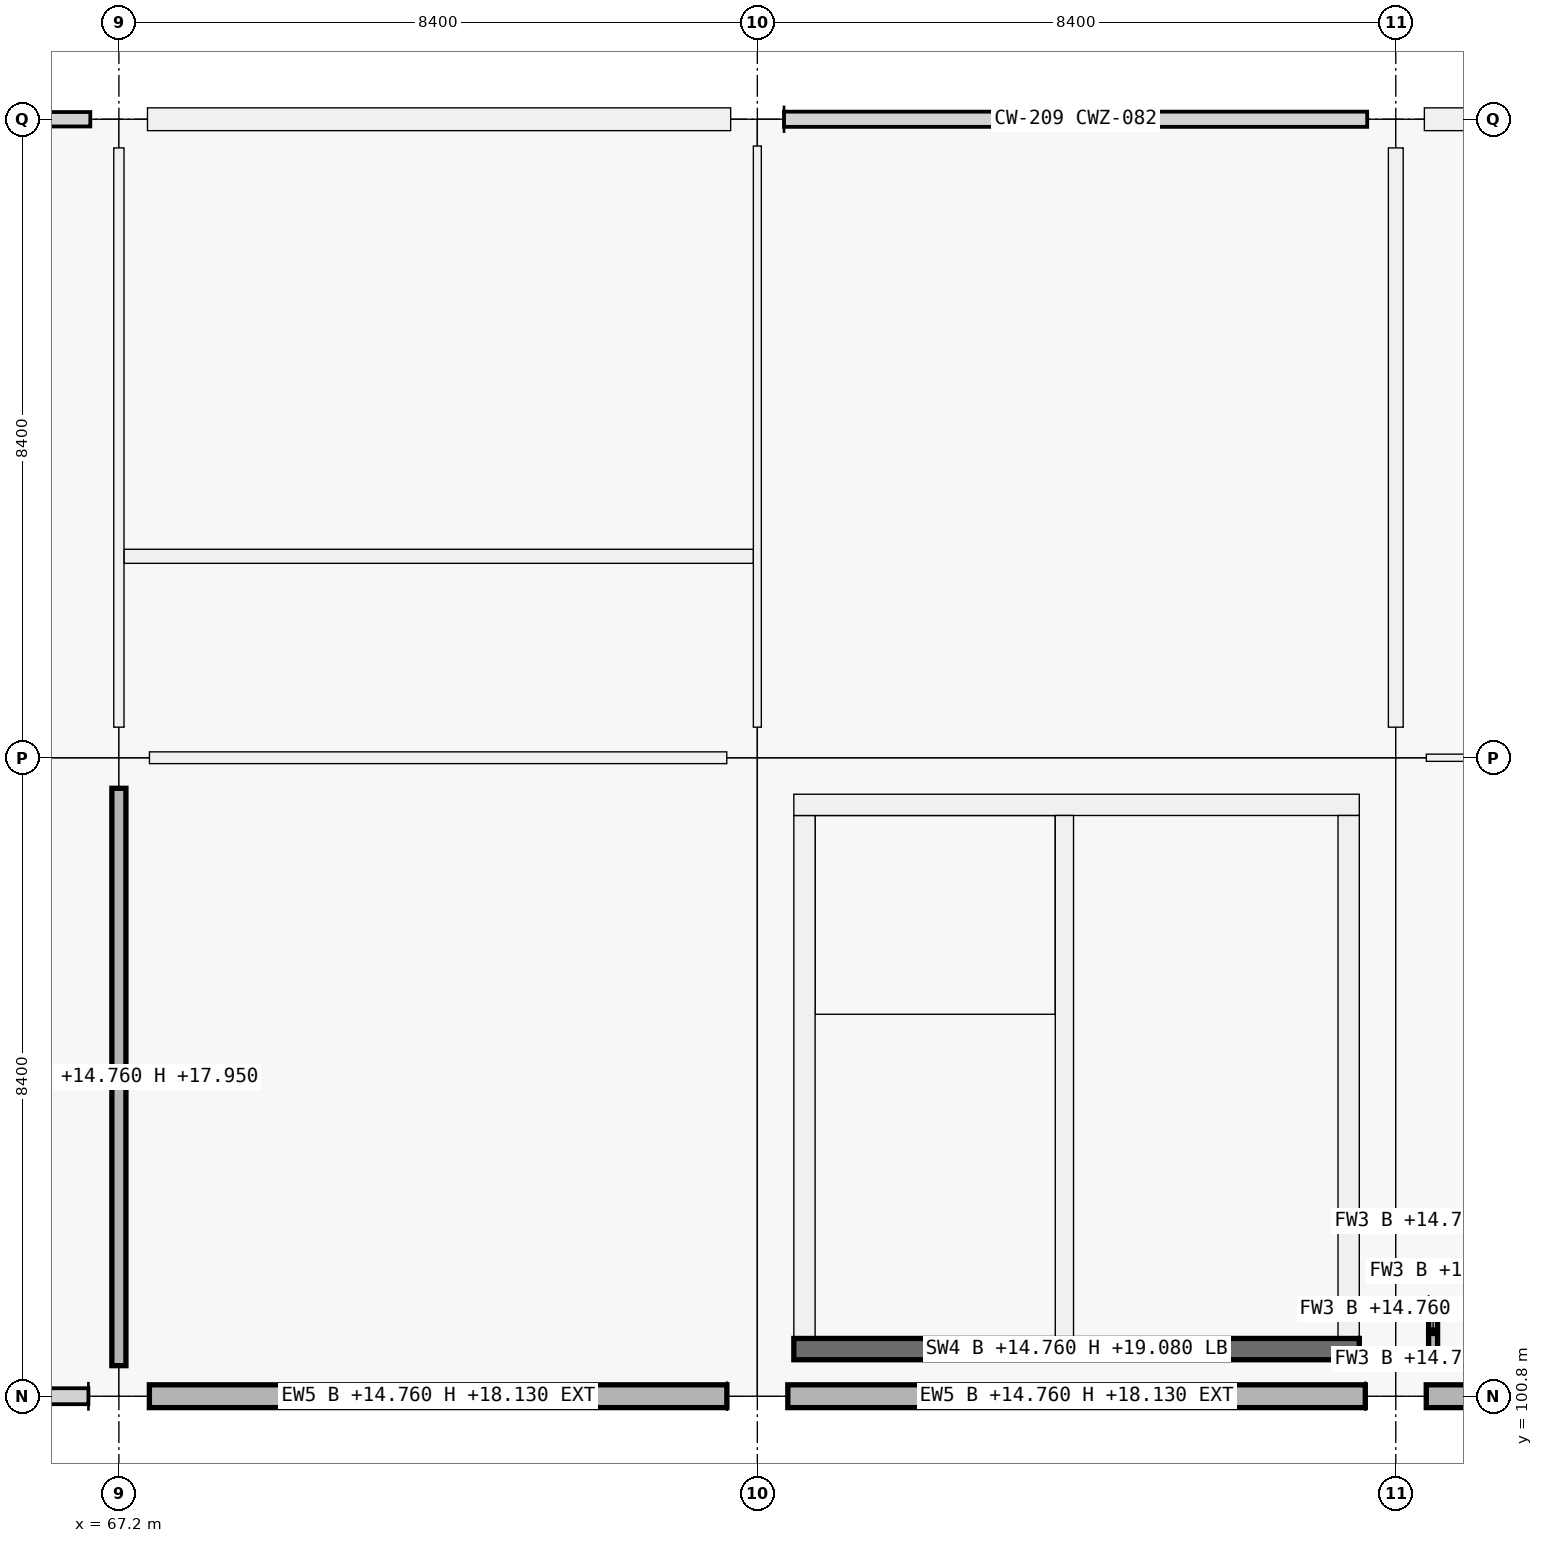
"""IFC4 building model, lengths in metres.
Left out: names, types, materials, properties, quantities, classifications, styles, units other than length and angle.
Written with IfcOpenShell. Run it as: python <this file> out.ifc"""

import sys

from ifc_helpers import new_model, si_unit, direction, frame, frame_2d, origin, origin_2d, place, context, subcontext, project, spatial, rectangle, extrude, element, fill, save


model = new_model("IFC4")
c1 = context("Model", 3, precision=1e-05, world=origin(), true_north=direction((0.0, 1.0)))
c2 = subcontext(c1, "Body", "Model", "MODEL_VIEW")
j1 = project(units=[si_unit("LENGTHUNIT", "METRE"), si_unit("PLANEANGLEUNIT", "RADIAN")], contexts=[c1])
p1 = place(None, origin())
s1 = spatial("IfcSite", under=j1, at=p1, CompositionType="ELEMENT")
p2 = place(p1, origin())
s2 = spatial("IfcBuilding", under=s1, at=p2, CompositionType="ELEMENT")
p3 = place(p2, frame((0.0, 0.0, 14.76)))
s3 = spatial("IfcBuildingStorey", under=s2, at=p3, CompositionType="ELEMENT", Elevation=14.76)
for number, where, z_axis, x_axis in (
    (1, (67.2, 100.8, 0.0), (0.0, 0.0, 1.0), (1.0, 0.0, 0.0)),
    (2, (67.2, 109.2, 0.0), (0.0, 0.0, 1.0), (1.0, 0.0, 0.0)),
):
    element("IfcColumn", number, at=place(p3, frame(where, z_axis=z_axis, x_axis=x_axis)), inside=s3, PredefinedType="COLUMN", context=c2, shape_type="SweptSolid", body=[
        extrude(rectangle(XDim=0.8, YDim=0.8, at=origin_2d()), origin(), (0.0, 0.0, 1.0), 4.32),
    ])
p4 = place(p3, frame((67.2, 117.6, 0.0), z_axis=(0.0, 0.0, 1.0), x_axis=(1.0, 0.0, 0.0)))
e3 = element("IfcColumn", 3, at=p4, inside=s3, PredefinedType="COLUMN", context=c2, shape_type="SweptSolid", body=[
    extrude(rectangle(XDim=0.75, YDim=0.75, at=origin_2d()), origin(), (0.0, 0.0, 1.0), 4.32),
])
for number, where, z_axis, x_axis in (
    (4, (75.6, 100.8, 0.0), (0.0, 0.0, 1.0), (1.0, 0.0, 0.0)),
    (5, (75.6, 109.2, 0.0), (0.0, 0.0, 1.0), (1.0, 0.0, 0.0)),
):
    element("IfcColumn", number, at=place(p3, frame(where, z_axis=z_axis, x_axis=x_axis)), inside=s3, PredefinedType="COLUMN", context=c2, shape_type="SweptSolid", body=[
        extrude(rectangle(XDim=0.8, YDim=0.8, at=origin_2d()), origin(), (0.0, 0.0, 1.0), 4.32),
    ])
p5 = place(p3, frame((75.6, 117.6, 0.0), z_axis=(0.0, 0.0, 1.0), x_axis=(1.0, 0.0, 0.0)))
e6 = element("IfcColumn", 6, at=p5, inside=s3, PredefinedType="COLUMN", context=c2, shape_type="SweptSolid", body=[
    extrude(rectangle(XDim=0.7, YDim=0.7, at=origin_2d()), origin(), (0.0, 0.0, 1.0), 4.32),
])
for number, where, z_axis, x_axis in (
    (7, (84.0, 100.8, 0.0), (0.0, 0.0, 1.0), (1.0, 0.0, 0.0)),
    (8, (84.0, 109.2, 0.0), (0.0, 0.0, 1.0), (1.0, 0.0, 0.0)),
):
    element("IfcColumn", number, at=place(p3, frame(where, z_axis=z_axis, x_axis=x_axis)), inside=s3, PredefinedType="COLUMN", context=c2, shape_type="SweptSolid", body=[
        extrude(rectangle(XDim=0.8, YDim=0.8, at=origin_2d()), origin(), (0.0, 0.0, 1.0), 4.32),
    ])
p6 = place(p3, frame((84.0, 117.6, 0.0), z_axis=(0.0, 0.0, 1.0), x_axis=(1.0, 0.0, 0.0)))
e9 = element("IfcColumn", 9, at=p6, inside=s3, PredefinedType="COLUMN", context=c2, shape_type="SweptSolid", body=[
    extrude(rectangle(XDim=0.75, YDim=0.75, at=origin_2d()), origin(), (0.0, 0.0, 1.0), 4.32),
])
p7 = place(p3, frame((75.199, 100.8, 0.0), z_axis=(0.0, 0.0, 1.0), x_axis=(-1.0, 0.0, 0.0)))
e10 = element("IfcWall", 10, at=p7, inside=s3, PredefinedType="SOLIDWALL", context=c2, shape_type="SweptSolid", body=[
    extrude(rectangle(XDim=7.598, YDim=0.3, at=frame_2d((3.799, 0.0))), origin(), (0.0, 0.0, 1.0), 3.37),
])
p8 = place(p7, frame((2.924, 0.0, 0.9)))
e11 = element("IfcOpeningElement", 11, at=p8, cuts=e10, PredefinedType="OPENING", context=c2, shape_type="SweptSolid", body=[
    extrude(rectangle(XDim=1.75, YDim=1.95, at=frame_2d((0.875, 0.975))), frame((0.0, 0.15, 0.0), z_axis=(0.0, -1.0, 0.0), x_axis=(1.0, 0.0, 0.0)), (0.0, 0.0, 1.0), 0.3),
])
p9 = place(p3, frame((67.576, 117.6, 0.0), z_axis=(0.0, 0.0, 1.0), x_axis=(1.0, 0.0, 0.0)))
e12 = element("IfcWall", 12, at=p9, inside=s3, PredefinedType="SOLIDWALL", context=c2, shape_type="SweptSolid", body=[
    extrude(rectangle(XDim=7.673, YDim=0.3, at=frame_2d((3.836, 0.0))), origin(), (0.0, 0.0, 1.0), 3.37),
])
p10 = place(p9, frame((2.761, 0.0, 0.9)))
e13 = element("IfcOpeningElement", 13, at=p10, cuts=e12, PredefinedType="OPENING", context=c2, shape_type="SweptSolid", body=[
    extrude(rectangle(XDim=2.15, YDim=1.95, at=frame_2d((1.075, 0.975))), frame((0.0, 0.15, 0.0), z_axis=(0.0, -1.0, 0.0), x_axis=(1.0, 0.0, 0.0)), (0.0, 0.0, 1.0), 0.3),
])
p11 = place(p3, frame((83.599, 100.8, 0.0), z_axis=(0.0, 0.0, 1.0), x_axis=(-1.0, 0.0, 0.0)))
e14 = element("IfcWall", 14, at=p11, inside=s3, PredefinedType="SOLIDWALL", context=c2, shape_type="SweptSolid", body=[
    extrude(rectangle(XDim=7.598, YDim=0.3, at=frame_2d((3.799, 0.0))), origin(), (0.0, 0.0, 1.0), 3.37),
])
p12 = place(p3, frame((91.999, 100.8, 0.0), z_axis=(0.0, 0.0, 1.0), x_axis=(-1.0, 0.0, 0.0)))
e15 = element("IfcWall", 15, at=p12, inside=s3, PredefinedType="SOLIDWALL", context=c2, shape_type="SweptSolid", body=[
    extrude(rectangle(XDim=7.598, YDim=0.3, at=frame_2d((3.799, 0.0))), origin(), (0.0, 0.0, 1.0), 3.37),
])
p13 = place(p12, frame((2.824, 0.0, 0.9)))
e16 = element("IfcOpeningElement", 16, at=p13, cuts=e15, PredefinedType="OPENING", context=c2, shape_type="SweptSolid", body=[
    extrude(rectangle(XDim=1.95, YDim=1.6, at=frame_2d((0.975, 0.8))), frame((0.0, 0.15, 0.0), z_axis=(0.0, -1.0, 0.0), x_axis=(1.0, 0.0, 0.0)), (0.0, 0.0, 1.0), 0.3),
])
p14 = place(p3, frame((84.376, 117.6, 0.0), z_axis=(0.0, 0.0, 1.0), x_axis=(1.0, 0.0, 0.0)))
e17 = element("IfcWall", 17, at=p14, inside=s3, PredefinedType="SOLIDWALL", context=c2, shape_type="SweptSolid", body=[
    extrude(rectangle(XDim=7.673, YDim=0.3, at=frame_2d((3.836, 0.0))), origin(), (0.0, 0.0, 1.0), 3.37),
])
p15 = place(p14, frame((2.662, 0.0, 0.9)))
e18 = element("IfcOpeningElement", 18, at=p15, cuts=e17, PredefinedType="OPENING", context=c2, shape_type="SweptSolid", body=[
    extrude(rectangle(XDim=2.35, YDim=1.6, at=frame_2d((1.175, 0.8))), frame((0.0, 0.15, 0.0), z_axis=(0.0, -1.0, 0.0), x_axis=(1.0, 0.0, 0.0)), (0.0, 0.0, 1.0), 0.3),
])
p16 = place(p3, frame((83.52, 101.42, 0.0), z_axis=(0.0, 0.0, 1.0), x_axis=(-1.0, 0.0, 0.0)))
e19 = element("IfcWall", 19, at=p16, inside=s3, PredefinedType="SHEAR", context=c2, shape_type="SweptSolid", body=[
    extrude(rectangle(XDim=7.44, YDim=0.28, at=frame_2d((3.72, 0.0))), origin(), (0.0, 0.0, 1.0), 4.32),
])
p17 = place(p3, frame((76.22, 101.56, 0.0), z_axis=(0.0, 0.0, 1.0), x_axis=(0.0, 1.0, 0.0)))
e20 = element("IfcWall", 20, at=p17, inside=s3, PredefinedType="SHEAR", context=c2, shape_type="SweptSolid", body=[
    extrude(rectangle(XDim=6.88, YDim=0.28, at=frame_2d((3.44, 0.0))), origin(), (0.0, 0.0, 1.0), 4.32),
])
p18 = place(p3, frame((76.08, 108.58, 0.0), z_axis=(0.0, 0.0, 1.0), x_axis=(1.0, 0.0, 0.0)))
e21 = element("IfcWall", 21, at=p18, inside=s3, PredefinedType="SHEAR", context=c2, shape_type="SweptSolid", body=[
    extrude(rectangle(XDim=7.44, YDim=0.28, at=frame_2d((3.72, 0.0))), origin(), (0.0, 0.0, 1.0), 4.32),
])
p19 = place(p3, frame((83.38, 108.44, 0.0), z_axis=(0.0, 0.0, 1.0), x_axis=(0.0, -1.0, 0.0)))
e22 = element("IfcWall", 22, at=p19, inside=s3, PredefinedType="SHEAR", context=c2, shape_type="SweptSolid", body=[
    extrude(rectangle(XDim=6.88, YDim=0.28, at=frame_2d((3.44, 0.0))), origin(), (0.0, 0.0, 1.0), 4.32),
])
p20 = place(p19, frame((3.99, 0.0, 0.0)))
e23 = element("IfcOpeningElement", 23, at=p20, cuts=e22, PredefinedType="OPENING", context=c2, shape_type="SweptSolid", body=[
    extrude(rectangle(XDim=1.5, YDim=2.15, at=frame_2d((0.75, 1.075))), frame((0.0, 0.14, 0.0), z_axis=(0.0, -1.0, 0.0), x_axis=(1.0, 0.0, 0.0)), (0.0, 0.0, 1.0), 0.28),
])
p21 = place(p3, frame((79.64, 101.56, 0.0), z_axis=(0.0, 0.0, 1.0), x_axis=(0.0, 1.0, 0.0)))
e24 = element("IfcWall", 24, at=p21, inside=s3, PredefinedType="SHEAR", context=c2, shape_type="SweptSolid", body=[
    extrude(rectangle(XDim=6.88, YDim=0.24, at=frame_2d((3.44, 0.0))), origin(), (0.0, 0.0, 1.0), 4.32),
])
p22 = place(p21, frame((0.12, 0.0, 0.0)))
e25 = element("IfcOpeningElement", 25, at=p22, cuts=e24, PredefinedType="OPENING", context=c2, shape_type="SweptSolid", body=[
    extrude(rectangle(XDim=1.0, YDim=2.15, at=frame_2d((0.5, 1.075))), frame((0.0, 0.12, 0.0), z_axis=(0.0, -1.0, 0.0), x_axis=(1.0, 0.0, 0.0)), (0.0, 0.0, 1.0), 0.24),
])
for number, where, z_axis, x_axis in (
    (26, (84.432, 101.291, 0.0), (0.0, 0.0, 1.0), (1.0, 0.0, 0.0)),
    (27, (84.432, 102.009, 0.0), (0.0, 0.0, 1.0), (1.0, 0.0, 0.0)),
):
    element("IfcWall", number, at=place(p3, frame(where, z_axis=z_axis, x_axis=x_axis)), inside=s3, PredefinedType="PARTITIONING", context=c2, shape_type="SweptSolid", body=[
        extrude(rectangle(XDim=1.036, YDim=0.118, at=frame_2d((0.518, 0.0))), origin(), (0.0, 0.0, 1.0), 3.35),
    ])
p23 = place(p3, frame((84.491, 101.35, 0.0), z_axis=(0.0, 0.0, 1.0), x_axis=(0.0, 1.0, 0.0)))
e28 = element("IfcWall", 28, at=p23, inside=s3, PredefinedType="PARTITIONING", context=c2, shape_type="SweptSolid", body=[
    extrude(rectangle(XDim=0.6, YDim=0.118, at=frame_2d((0.3, 0.0))), origin(), (0.0, 0.0, 1.0), 3.35),
])
p24 = place(p3, frame((67.602, 109.2, 0.0), z_axis=(0.0, 0.0, 1.0), x_axis=(1.0, 0.0, 0.0)))
e29 = element("IfcWall", 29, at=p24, inside=s3, PredefinedType="PARTITIONING", context=c2, shape_type="SweptSolid", body=[
    extrude(rectangle(XDim=7.596, YDim=0.155, at=frame_2d((3.798, 0.0))), origin(), (0.0, 0.0, 1.0), 3.19),
])
p25 = place(p3, frame((84.402, 109.2, 0.0), z_axis=(0.0, 0.0, 1.0), x_axis=(1.0, 0.0, 0.0)))
e30 = element("IfcWall", 30, at=p25, inside=s3, PredefinedType="PARTITIONING", context=c2, shape_type="SweptSolid", body=[
    extrude(rectangle(XDim=7.596, YDim=0.095, at=frame_2d((3.798, 0.0))), origin(), (0.0, 0.0, 1.0), 3.19),
])
p26 = place(p25, frame((3.308, 0.0, 0.0)))
e31 = element("IfcOpeningElement", 31, at=p26, cuts=e30, PredefinedType="OPENING", context=c2, shape_type="SweptSolid", body=[
    extrude(rectangle(XDim=0.98, YDim=2.18, at=frame_2d((0.49, 1.09))), frame((0.0, 0.047, 0.0), z_axis=(0.0, -1.0, 0.0), x_axis=(1.0, 0.0, 0.0)), (0.0, 0.0, 1.0), 0.095),
])
p27 = place(p3, frame((67.2, 101.202, 0.0), z_axis=(0.0, 0.0, 1.0), x_axis=(0.0, 1.0, 0.0)))
e32 = element("IfcWall", 32, at=p27, inside=s3, PredefinedType="PARTITIONING", context=c2, shape_type="SweptSolid", body=[
    extrude(rectangle(XDim=7.596, YDim=0.185, at=frame_2d((3.798, 0.0))), origin(), (0.0, 0.0, 1.0), 3.19),
])
p28 = place(p27, frame((3.318, 0.0, 0.0)))
e33 = element("IfcOpeningElement", 33, at=p28, cuts=e32, PredefinedType="OPENING", context=c2, shape_type="SweptSolid", body=[
    extrude(rectangle(XDim=0.96, YDim=2.18, at=frame_2d((0.48, 1.09))), frame((0.0, 0.093, 0.0), z_axis=(0.0, -1.0, 0.0), x_axis=(1.0, 0.0, 0.0)), (0.0, 0.0, 1.0), 0.185),
])
p29 = place(p3, frame((67.2, 109.602, 0.0), z_axis=(0.0, 0.0, 1.0), x_axis=(0.0, 1.0, 0.0)))
e34 = element("IfcWall", 34, at=p29, inside=s3, PredefinedType="PARTITIONING", context=c2, shape_type="SweptSolid", body=[
    extrude(rectangle(XDim=7.621, YDim=0.135, at=frame_2d((3.811, 0.0))), origin(), (0.0, 0.0, 1.0), 3.19),
])
p30 = place(p29, frame((0.573, 0.0, 0.0)))
e35 = element("IfcOpeningElement", 35, at=p30, cuts=e34, PredefinedType="OPENING", context=c2, shape_type="SweptSolid", body=[
    extrude(rectangle(XDim=0.98, YDim=2.08, at=frame_2d((0.49, 1.04))), frame((0.0, 0.067, 0.0), z_axis=(0.0, -1.0, 0.0), x_axis=(1.0, 0.0, 0.0)), (0.0, 0.0, 1.0), 0.135),
])
p31 = place(p29, frame((4.513, 0.0, 0.0)))
e36 = element("IfcOpeningElement", 36, at=p31, cuts=e34, PredefinedType="OPENING", context=c2, shape_type="SweptSolid", body=[
    extrude(rectangle(XDim=0.94, YDim=2.08, at=frame_2d((0.47, 1.04))), frame((0.0, 0.067, 0.0), z_axis=(0.0, -1.0, 0.0), x_axis=(1.0, 0.0, 0.0)), (0.0, 0.0, 1.0), 0.135),
])
p32 = place(p3, frame((75.6, 109.602, 0.0), z_axis=(0.0, 0.0, 1.0), x_axis=(0.0, 1.0, 0.0)))
e37 = element("IfcWall", 37, at=p32, inside=s3, PredefinedType="PARTITIONING", context=c2, shape_type="SweptSolid", body=[
    extrude(rectangle(XDim=7.646, YDim=0.105, at=frame_2d((3.823, 0.0))), origin(), (0.0, 0.0, 1.0), 3.19),
])
p33 = place(p3, frame((84.0, 109.602, 0.0), z_axis=(0.0, 0.0, 1.0), x_axis=(0.0, 1.0, 0.0)))
e38 = element("IfcWall", 38, at=p33, inside=s3, PredefinedType="PARTITIONING", context=c2, shape_type="SweptSolid", body=[
    extrude(rectangle(XDim=7.621, YDim=0.195, at=frame_2d((3.811, 0.0))), origin(), (0.0, 0.0, 1.0), 3.19),
])
p34 = place(p33, frame((3.301, 0.0, 0.0)))
e39 = element("IfcOpeningElement", 39, at=p34, cuts=e38, PredefinedType="OPENING", context=c2, shape_type="SweptSolid", body=[
    extrude(rectangle(XDim=1.02, YDim=2.2, at=frame_2d((0.51, 1.1))), frame((0.0, 0.098, 0.0), z_axis=(0.0, -1.0, 0.0), x_axis=(1.0, 0.0, 0.0)), (0.0, 0.0, 1.0), 0.195),
])
p35 = place(p3, frame((67.27, 111.85, 0.0), z_axis=(0.0, 0.0, 1.0), x_axis=(1.0, 0.0, 0.0)))
e40 = element("IfcWall", 40, at=p35, inside=s3, PredefinedType="PARTITIONING", context=c2, shape_type="SweptSolid", body=[
    extrude(rectangle(XDim=8.276, YDim=0.185, at=frame_2d((4.138, 0.0))), origin(), (0.0, 0.0, 1.0), 3.19),
])
p36 = place(p8, origin())
e41 = element("IfcWindow", 41, at=p36, inside=s3, PartitioningType="SINGLE_PANEL", PredefinedType="WINDOW", context=c2, shape_type="SweptSolid", body=[
    extrude(rectangle(XDim=1.75, YDim=1.95, at=frame_2d((0.875, 0.975))), frame((0.0, 0.03, 0.0), z_axis=(0.0, -1.0, 0.0), x_axis=(1.0, 0.0, 0.0)), (0.0, 0.0, 1.0), 0.06),
])
fill(e11, e41)
p37 = place(p10, origin())
e42 = element("IfcWindow", 42, at=p37, inside=s3, PartitioningType="SINGLE_PANEL", PredefinedType="WINDOW", context=c2, shape_type="SweptSolid", body=[
    extrude(rectangle(XDim=2.15, YDim=1.95, at=frame_2d((1.075, 0.975))), frame((0.0, 0.03, 0.0), z_axis=(0.0, -1.0, 0.0), x_axis=(1.0, 0.0, 0.0)), (0.0, 0.0, 1.0), 0.06),
])
fill(e13, e42)
p38 = place(p22, origin())
e43 = element("IfcDoor", 43, at=p38, inside=s3, OperationType="SINGLE_SWING_RIGHT", PredefinedType="DOOR", context=c2, shape_type="SweptSolid", body=[
    extrude(rectangle(XDim=1.0, YDim=2.15, at=frame_2d((0.5, 1.075))), frame((0.0, 0.025, 0.0), z_axis=(0.0, -1.0, 0.0), x_axis=(1.0, 0.0, 0.0)), (0.0, 0.0, 1.0), 0.05),
])
fill(e25, e43)
p39 = place(p20, origin())
e44 = element("IfcDoor", 44, at=p39, inside=s3, OperationType="DOUBLE_DOOR_SINGLE_SWING", PredefinedType="DOOR", context=c2, shape_type="SweptSolid", body=[
    extrude(rectangle(XDim=1.5, YDim=2.15, at=frame_2d((0.75, 1.075))), frame((0.0, 0.025, 0.0), z_axis=(0.0, -1.0, 0.0), x_axis=(1.0, 0.0, 0.0)), (0.0, 0.0, 1.0), 0.05),
])
fill(e23, e44)
p40 = place(p30, origin())
e45 = element("IfcDoor", 45, at=p40, inside=s3, OperationType="SINGLE_SWING_RIGHT", PredefinedType="DOOR", context=c2, shape_type="SweptSolid", body=[
    extrude(rectangle(XDim=0.98, YDim=2.08, at=frame_2d((0.49, 1.04))), frame((0.0, 0.025, 0.0), z_axis=(0.0, -1.0, 0.0), x_axis=(1.0, 0.0, 0.0)), (0.0, 0.0, 1.0), 0.05),
])
fill(e35, e45)
p41 = place(p31, origin())
e46 = element("IfcDoor", 46, at=p41, inside=s3, OperationType="SINGLE_SWING_LEFT", PredefinedType="DOOR", context=c2, shape_type="SweptSolid", body=[
    extrude(rectangle(XDim=0.94, YDim=2.08, at=frame_2d((0.47, 1.04))), frame((0.0, 0.025, 0.0), z_axis=(0.0, -1.0, 0.0), x_axis=(1.0, 0.0, 0.0)), (0.0, 0.0, 1.0), 0.05),
])
fill(e36, e46)
p42 = place(p28, origin())
e47 = element("IfcDoor", 47, at=p42, inside=s3, OperationType="SINGLE_SWING_LEFT", PredefinedType="DOOR", context=c2, shape_type="SweptSolid", body=[
    extrude(rectangle(XDim=0.96, YDim=2.18, at=frame_2d((0.48, 1.09))), frame((0.0, 0.025, 0.0), z_axis=(0.0, -1.0, 0.0), x_axis=(1.0, 0.0, 0.0)), (0.0, 0.0, 1.0), 0.05),
])
fill(e33, e47)
p43 = place(p34, origin())
e48 = element("IfcDoor", 48, at=p43, inside=s3, OperationType="SINGLE_SWING_LEFT", PredefinedType="DOOR", context=c2, shape_type="SweptSolid", body=[
    extrude(rectangle(XDim=1.02, YDim=2.2, at=frame_2d((0.51, 1.1))), frame((0.0, 0.025, 0.0), z_axis=(0.0, -1.0, 0.0), x_axis=(1.0, 0.0, 0.0)), (0.0, 0.0, 1.0), 0.05),
])
fill(e39, e48)
save(model, sys.argv[1])
